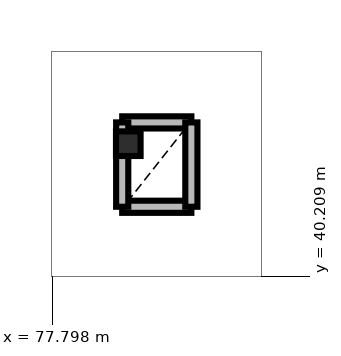
"""IFC4 building model, lengths in metres.
Left out: names, types, materials, properties, quantities, classifications, styles, units other than length and angle.
Written with IfcOpenShell. Run it as: python <this file> out.ifc"""

import sys

from ifc_helpers import new_model, si_unit, direction, frame, frame_2d, origin, origin_2d, place, context, subcontext, project, spatial, rectangle, hollow_circle, extrude, element, save


model = new_model("IFC4")
c1 = context("Model", 3, precision=1e-05, world=origin(), true_north=direction((0.0, 1.0)))
c2 = subcontext(c1, "Body", "Model", "MODEL_VIEW")
j1 = project(units=[si_unit("LENGTHUNIT", "METRE"), si_unit("PLANEANGLEUNIT", "RADIAN")], contexts=[c1])
p1 = place(None, origin())
s1 = spatial("IfcSite", under=j1, at=p1, CompositionType="ELEMENT")
p2 = place(p1, origin())
s2 = spatial("IfcBuilding", under=s1, at=p2, CompositionType="ELEMENT")
p3 = place(p2, frame((0.0, 0.0, 5.1)))
s3 = spatial("IfcBuildingStorey", under=s2, at=p3, CompositionType="ELEMENT", Elevation=5.1)
p4 = place(p3, frame((78.8, 41.95, 0.0), z_axis=(0.0, 0.0, 1.0), x_axis=(1.0, 0.0, 0.0)))
e1 = element("IfcColumn", 1, at=p4, inside=s3, PredefinedType="COLUMN", context=c2, shape_type="SweptSolid", body=[
    extrude(hollow_circle(Radius=0.162, WallThickness=0.012, at=origin_2d()), origin(), (0.0, 0.0, 1.0), 4.2),
])
for number, where, z_axis, x_axis in (
    (2, (78.72, 41.12, 0.0), (0.0, 0.0, 1.0), (1.0, 0.0, 0.0)),
    (3, (79.63, 42.23, 0.0), (0.0, 0.0, 1.0), (-1.0, 0.0, 0.0)),
):
    element("IfcWall", number, at=place(p3, frame(where, z_axis=z_axis, x_axis=x_axis)), inside=s3, PredefinedType="PARTITIONING", context=c2, shape_type="SweptSolid", body=[
        extrude(rectangle(XDim=0.91, YDim=0.16, at=frame_2d((0.455, 0.0))), origin(), (0.0, 0.0, 1.0), 3.65),
    ])
for number, where, z_axis, x_axis in (
    (4, (78.72, 42.23, 0.0), (0.0, 0.0, 1.0), (0.0, -1.0, 0.0)),
    (5, (79.63, 41.12, 0.0), (0.0, 0.0, 1.0), (0.0, 1.0, 0.0)),
):
    element("IfcWall", number, at=place(p3, frame(where, z_axis=z_axis, x_axis=x_axis)), inside=s3, PredefinedType="PARTITIONING", context=c2, shape_type="SweptSolid", body=[
        extrude(rectangle(XDim=1.11, YDim=0.16, at=frame_2d((0.555, 0.0))), origin(), (0.0, 0.0, 1.0), 3.65),
    ])
save(model, sys.argv[1])
